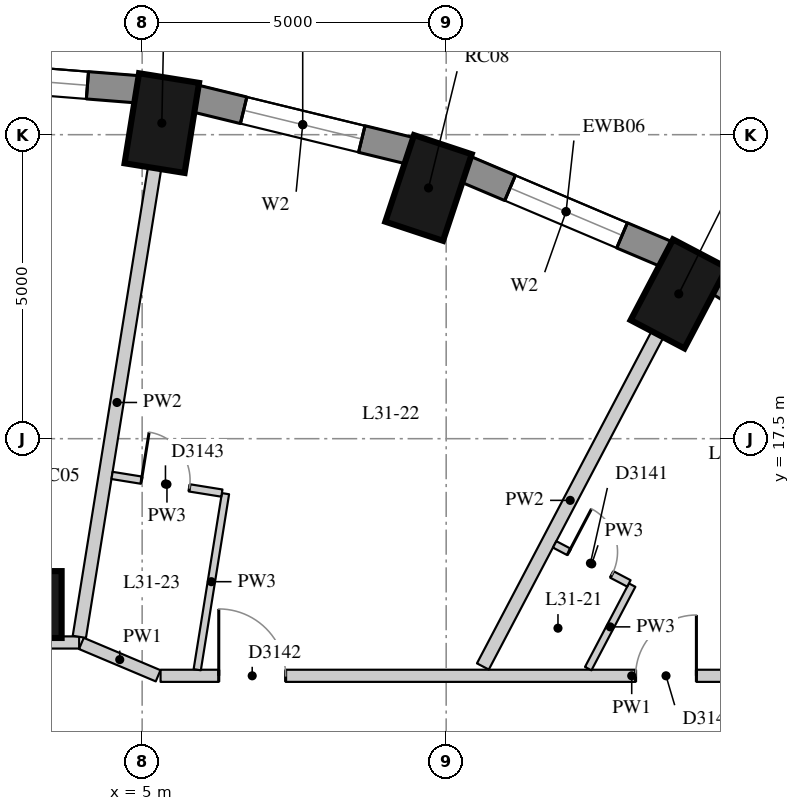
"""IFC4 building model, lengths in metres.
Left out: names, types, materials, properties, quantities, classifications, styles, units other than length and angle.
Written with IfcOpenShell. Run it as: python <this file> out.ifc"""

import sys

from ifc_helpers import new_model, si_unit, direction, frame, frame_2d, origin, origin_2d, place, context, subcontext, project, spatial, rectangle, extrude, element, fill, save


model = new_model("IFC4")
c1 = context("Model", 3, precision=1e-05, world=origin(), true_north=direction((0.0, 1.0)))
c2 = subcontext(c1, "Body", "Model", "MODEL_VIEW")
j1 = project(units=[si_unit("LENGTHUNIT", "METRE"), si_unit("PLANEANGLEUNIT", "RADIAN")], contexts=[c1])
p1 = place(None, origin())
s1 = spatial("IfcSite", under=j1, at=p1, CompositionType="ELEMENT")
p2 = place(p1, origin())
s2 = spatial("IfcBuilding", under=s1, at=p2, CompositionType="ELEMENT")
p3 = place(p2, frame((0.0, 0.0, 112.0)))
s3 = spatial("IfcBuildingStorey", under=s2, at=p3, CompositionType="ELEMENT", Elevation=112.0)
for number, where, z_axis, x_axis in (
    (1, (13.825, 19.882, 0.0), (0.0, 0.0, 1.0), (0.465, 0.885, 0.0)),
    (2, (9.71, 21.624, 0.0), (0.0, 0.0, 1.0), (0.315, 0.949, 0.0)),
    (3, (5.323, 22.691, 0.0), (0.0, 0.0, 1.0), (0.159, 0.987, 0.0)),
):
    element("IfcColumn", number, at=place(p3, frame(where, z_axis=z_axis, x_axis=x_axis)), inside=s3, PredefinedType="COLUMN", context=c2, shape_type="SweptSolid", body=[
        extrude(rectangle(XDim=1.5, YDim=1.0, at=origin_2d()), origin(), (0.0, 0.0, 1.0), 3.3),
    ])
p4 = place(p3, frame((3.126, 14.772, 0.0), z_axis=(0.0, 0.0, 1.0), x_axis=(1.0, 0.0, 0.0)))
e4 = element("IfcColumn", 4, at=p4, inside=s3, PredefinedType="COLUMN", context=c2, shape_type="SweptSolid", body=[
    extrude(rectangle(XDim=1.1, YDim=1.1, at=origin_2d()), origin(), (0.0, 0.0, 1.0), 3.3),
])
p5 = place(p3, frame((17.456, 18.192, 0.0), z_axis=(0.0, 0.0, 1.0), x_axis=(-0.843880549131, 0.536531097699, 0.0)))
e5 = element("IfcWall", 5, at=p5, inside=s3, PredefinedType="SOLIDWALL", context=c2, shape_type="SweptSolid", body=[
    extrude(rectangle(XDim=3.532, YDim=0.45, at=frame_2d((1.766, 0.0))), origin(), (0.0, 0.0, 1.0), 3.02),
])
p6 = place(p5, frame((0.766, 0.0, 0.4)))
e6 = element("IfcOpeningElement", 6, at=p6, cuts=e5, PredefinedType="OPENING", context=c2, shape_type="SweptSolid", body=[
    extrude(rectangle(XDim=2.0, YDim=1.75, at=frame_2d((1.0, 0.875))), frame((0.0, 0.235, 0.0), z_axis=(0.0, -1.0, 0.0), x_axis=(1.0, 0.0, 0.0)), (0.0, 0.0, 1.0), 0.47),
])
p7 = place(p3, frame((13.625, 20.533, 0.0), z_axis=(0.0, 0.0, 1.0), x_axis=(-0.920869643542, 0.389870619055, 0.0)))
e7 = element("IfcWall", 7, at=p7, inside=s3, PredefinedType="SOLIDWALL", context=c2, shape_type="SweptSolid", body=[
    extrude(rectangle(XDim=3.591, YDim=0.45, at=frame_2d((1.796, 0.0))), origin(), (0.0, 0.0, 1.0), 3.02),
])
p8 = place(p7, frame((0.796, 0.0, 0.4)))
e8 = element("IfcOpeningElement", 8, at=p8, cuts=e7, PredefinedType="OPENING", context=c2, shape_type="SweptSolid", body=[
    extrude(rectangle(XDim=2.0, YDim=1.75, at=frame_2d((1.0, 0.875))), frame((0.0, 0.235, 0.0), z_axis=(0.0, -1.0, 0.0), x_axis=(1.0, 0.0, 0.0)), (0.0, 0.0, 1.0), 0.47),
])
p9 = place(p3, frame((9.406, 22.235, 0.0), z_axis=(0.0, 0.0, 1.0), x_axis=(-0.971667603162, 0.236351579148, 0.0)))
e9 = element("IfcWall", 9, at=p9, inside=s3, PredefinedType="SOLIDWALL", context=c2, shape_type="SweptSolid", body=[
    extrude(rectangle(XDim=3.635, YDim=0.45, at=frame_2d((1.817, 0.0))), origin(), (0.0, 0.0, 1.0), 3.02),
])
p10 = place(p9, frame((0.817, 0.0, 0.4)))
e10 = element("IfcOpeningElement", 10, at=p10, cuts=e9, PredefinedType="OPENING", context=c2, shape_type="SweptSolid", body=[
    extrude(rectangle(XDim=2.0, YDim=1.75, at=frame_2d((1.0, 0.875))), frame((0.0, 0.235, 0.0), z_axis=(0.0, -1.0, 0.0), x_axis=(1.0, 0.0, 0.0)), (0.0, 0.0, 1.0), 0.47),
])
p11 = place(p3, frame((4.927, 23.247, 0.0), z_axis=(0.0, 0.0, 1.0), x_axis=(-0.996862216754, 0.079156306178, 0.0)))
e11 = element("IfcWall", 11, at=p11, inside=s3, PredefinedType="SOLIDWALL", context=c2, shape_type="SweptSolid", body=[
    extrude(rectangle(XDim=3.658, YDim=0.45, at=frame_2d((1.829, 0.0))), origin(), (0.0, 0.0, 1.0), 3.02),
])
p12 = place(p11, frame((0.829, 0.0, 0.4)))
e12 = element("IfcOpeningElement", 12, at=p12, cuts=e11, PredefinedType="OPENING", context=c2, shape_type="SweptSolid", body=[
    extrude(rectangle(XDim=2.0, YDim=1.75, at=frame_2d((1.0, 0.875))), frame((0.0, 0.235, 0.0), z_axis=(0.0, -1.0, 0.0), x_axis=(1.0, 0.0, 0.0)), (0.0, 0.0, 1.0), 0.47),
])
p13 = place(p3, frame((-2.324, 14.148, 0.0), z_axis=(0.0, 0.0, 1.0), x_axis=(1.0, 0.0, 0.0)))
e13 = element("IfcWall", 13, at=p13, inside=s3, PredefinedType="PARTITIONING", context=c2, shape_type="SweptSolid", body=[
    extrude(rectangle(XDim=6.288, YDim=0.2, at=frame_2d((3.144, 0.0))), origin(), (0.0, 0.0, 1.0), 3.02),
])
p14 = place(p13, frame((3.617, 0.0, 0.0)))
e14 = element("IfcOpeningElement", 14, at=p14, cuts=e13, PredefinedType="OPENING", context=c2, shape_type="SweptSolid", body=[
    extrude(rectangle(XDim=0.9, YDim=2.1, at=frame_2d((0.45, 1.05))), frame((0.0, 0.11, 0.0), z_axis=(0.0, -1.0, 0.0), x_axis=(1.0, 0.0, 0.0)), (0.0, 0.0, 1.0), 0.22),
])
p15 = place(p13, frame((0.22, 0.0, 0.0)))
e15 = element("IfcOpeningElement", 15, at=p15, cuts=e13, PredefinedType="OPENING", context=c2, shape_type="SweptSolid", body=[
    extrude(rectangle(XDim=1.0, YDim=2.1, at=frame_2d((0.5, 1.05))), frame((0.0, 0.11, 0.0), z_axis=(0.0, -1.0, 0.0), x_axis=(1.0, 0.0, 0.0)), (0.0, 0.0, 1.0), 0.22),
])
p16 = place(p3, frame((4.0, 14.133, 0.0), z_axis=(0.0, 0.0, 1.0), x_axis=(0.921370144432, -0.388686322051, 0.0)))
e16 = element("IfcWall", 16, at=p16, inside=s3, PredefinedType="PARTITIONING", context=c2, shape_type="SweptSolid", body=[
    extrude(rectangle(XDim=1.37, YDim=0.2, at=frame_2d((0.685, 0.0))), origin(), (0.0, 0.0, 1.0), 3.02),
])
p17 = place(p3, frame((5.303, 13.6, 0.0), z_axis=(0.0, 0.0, 1.0), x_axis=(1.0, 0.0, 0.0)))
e17 = element("IfcWall", 17, at=p17, inside=s3, PredefinedType="PARTITIONING", context=c2, shape_type="SweptSolid", body=[
    extrude(rectangle(XDim=15.497, YDim=0.2, at=frame_2d((7.749, 0.0))), origin(), (0.0, 0.0, 1.0), 3.02),
])
p18 = place(p17, frame((7.812, 0.0, 0.0)))
e18 = element("IfcOpeningElement", 18, at=p18, cuts=e17, PredefinedType="OPENING", context=c2, shape_type="SweptSolid", body=[
    extrude(rectangle(XDim=1.0, YDim=2.1, at=frame_2d((0.5, 1.05))), frame((0.0, 0.11, 0.0), z_axis=(0.0, -1.0, 0.0), x_axis=(1.0, 0.0, 0.0)), (0.0, 0.0, 1.0), 0.22),
])
p19 = place(p17, frame((0.957, 0.0, 0.0)))
e19 = element("IfcOpeningElement", 19, at=p19, cuts=e17, PredefinedType="OPENING", context=c2, shape_type="SweptSolid", body=[
    extrude(rectangle(XDim=1.1, YDim=2.1, at=frame_2d((0.55, 1.05))), frame((0.0, 0.11, 0.0), z_axis=(0.0, -1.0, 0.0), x_axis=(1.0, 0.0, 0.0)), (0.0, 0.0, 1.0), 0.22),
])
p20 = place(p17, frame((11.467, 0.0, 0.0)))
e20 = element("IfcOpeningElement", 20, at=p20, cuts=e17, PredefinedType="OPENING", context=c2, shape_type="SweptSolid", body=[
    extrude(rectangle(XDim=1.8, YDim=2.1, at=frame_2d((0.9, 1.05))), frame((0.0, 0.11, 0.0), z_axis=(0.0, -1.0, 0.0), x_axis=(1.0, 0.0, 0.0)), (0.0, 0.0, 1.0), 0.22),
])
p21 = place(p3, frame((13.476, 19.218, 0.0), z_axis=(0.0, 0.0, 1.0), x_axis=(-0.465345394262, -0.885129179295, 0.0)))
e21 = element("IfcWall", 21, at=p21, inside=s3, PredefinedType="PARTITIONING", context=c2, shape_type="SweptSolid", body=[
    extrude(rectangle(XDim=6.173, YDim=0.22, at=frame_2d((3.086, 0.0))), origin(), (0.0, 0.0, 1.0), 3.02),
])
p22 = place(p3, frame((5.205, 21.95, 0.0), z_axis=(0.0, 0.0, 1.0), x_axis=(-0.158499016873, -0.987359135092, 0.0)))
e22 = element("IfcWall", 22, at=p22, inside=s3, PredefinedType="PARTITIONING", context=c2, shape_type="SweptSolid", body=[
    extrude(rectangle(XDim=7.808, YDim=0.22, at=frame_2d((3.904, 0.0))), origin(), (0.0, 0.0, 1.0), 3.02),
])
p23 = place(p3, frame((12.336, 13.718, 0.0), z_axis=(0.0, 0.0, 1.0), x_axis=(0.465428746876, 0.88508535271, 0.0)))
e23 = element("IfcWall", 23, at=p23, inside=s3, PredefinedType="PARTITIONING", context=c2, shape_type="SweptSolid", body=[
    extrude(rectangle(XDim=1.552, YDim=0.12, at=frame_2d((0.776, 0.0))), origin(), (0.0, 0.0, 1.0), 3.02),
])
p24 = place(p3, frame((5.906, 13.7, 0.0), z_axis=(0.0, 0.0, 1.0), x_axis=(0.158509986532, 0.98735737409, 0.0)))
e24 = element("IfcWall", 24, at=p24, inside=s3, PredefinedType="PARTITIONING", context=c2, shape_type="SweptSolid", body=[
    extrude(rectangle(XDim=2.933, YDim=0.12, at=frame_2d((1.466, 0.0))), origin(), (0.0, 0.0, 1.0), 3.02),
])
p25 = place(p3, frame((13.005, 15.12, 0.0), z_axis=(0.0, 0.0, 1.0), x_axis=(-0.885148383454, 0.465308864378, 0.0)))
e25 = element("IfcWall", 25, at=p25, inside=s3, PredefinedType="PARTITIONING", context=c2, shape_type="SweptSolid", body=[
    extrude(rectangle(XDim=1.38, YDim=0.12, at=frame_2d((0.69, 0.0))), origin(), (0.0, 0.0, 1.0), 3.02),
])
p26 = place(p25, frame((0.315, 0.0, 0.0)))
e26 = element("IfcOpeningElement", 26, at=p26, cuts=e25, PredefinedType="OPENING", context=c2, shape_type="SweptSolid", body=[
    extrude(rectangle(XDim=0.8, YDim=2.1, at=frame_2d((0.4, 1.05))), frame((0.0, 0.07, 0.0), z_axis=(0.0, -1.0, 0.0), x_axis=(1.0, 0.0, 0.0)), (0.0, 0.0, 1.0), 0.14),
])
p27 = place(p3, frame((6.311, 16.605, 0.0), z_axis=(0.0, 0.0, 1.0), x_axis=(-0.987336342922, 0.158640934018, 0.0)))
e27 = element("IfcWall", 27, at=p27, inside=s3, PredefinedType="PARTITIONING", context=c2, shape_type="SweptSolid", body=[
    extrude(rectangle(XDim=1.83, YDim=0.12, at=frame_2d((0.915, 0.0))), origin(), (0.0, 0.0, 1.0), 3.02),
])
p28 = place(p27, frame((0.54, 0.0, 0.0)))
e28 = element("IfcOpeningElement", 28, at=p28, cuts=e27, PredefinedType="OPENING", context=c2, shape_type="SweptSolid", body=[
    extrude(rectangle(XDim=0.8, YDim=2.1, at=frame_2d((0.4, 1.05))), frame((0.0, 0.07, 0.0), z_axis=(0.0, -1.0, 0.0), x_axis=(1.0, 0.0, 0.0)), (0.0, 0.0, 1.0), 0.14),
])
p29 = place(p8, origin())
e29 = element("IfcWindow", 29, at=p29, inside=s3, PartitioningType="SINGLE_PANEL", PredefinedType="WINDOW", context=c2, shape_type="SweptSolid", body=[
    extrude(rectangle(XDim=2.0, YDim=1.75, at=frame_2d((1.0, 0.875))), frame((0.0, 0.035, 0.0), z_axis=(0.0, -1.0, 0.0), x_axis=(1.0, 0.0, 0.0)), (0.0, 0.0, 1.0), 0.06),
])
fill(e8, e29)
p30 = place(p10, origin())
e30 = element("IfcWindow", 30, at=p30, inside=s3, PartitioningType="SINGLE_PANEL", PredefinedType="WINDOW", context=c2, shape_type="SweptSolid", body=[
    extrude(rectangle(XDim=2.0, YDim=1.75, at=frame_2d((1.0, 0.875))), frame((0.0, 0.035, 0.0), z_axis=(0.0, -1.0, 0.0), x_axis=(1.0, 0.0, 0.0)), (0.0, 0.0, 1.0), 0.06),
])
fill(e10, e30)
p31 = place(p12, origin())
e31 = element("IfcWindow", 31, at=p31, inside=s3, PartitioningType="SINGLE_PANEL", PredefinedType="WINDOW", context=c2, shape_type="SweptSolid", body=[
    extrude(rectangle(XDim=2.0, YDim=1.75, at=frame_2d((1.0, 0.875))), frame((0.0, 0.035, 0.0), z_axis=(0.0, -1.0, 0.0), x_axis=(1.0, 0.0, 0.0)), (0.0, 0.0, 1.0), 0.06),
])
fill(e12, e31)
p32 = place(p18, origin())
e32 = element("IfcDoor", 32, at=p32, inside=s3, OperationType="SINGLE_SWING_RIGHT", PredefinedType="DOOR", context=c2, shape_type="SweptSolid", body=[
    extrude(rectangle(XDim=1.0, YDim=2.1, at=frame_2d((0.5, 1.05))), frame((0.0, 0.025, 0.0), z_axis=(0.0, -1.0, 0.0), x_axis=(1.0, 0.0, 0.0)), (0.0, 0.0, 1.0), 0.05),
])
fill(e18, e32)
p33 = place(p26, origin())
e33 = element("IfcDoor", 33, at=p33, inside=s3, OperationType="SINGLE_SWING_LEFT", PredefinedType="DOOR", context=c2, shape_type="SweptSolid", body=[
    extrude(rectangle(XDim=0.8, YDim=2.1, at=frame_2d((0.4, 1.05))), frame((0.0, 0.025, 0.0), z_axis=(0.0, -1.0, 0.0), x_axis=(1.0, 0.0, 0.0)), (0.0, 0.0, 1.0), 0.05),
])
fill(e26, e33)
p34 = place(p19, origin())
e34 = element("IfcDoor", 34, at=p34, inside=s3, OperationType="SINGLE_SWING_LEFT", PredefinedType="DOOR", context=c2, shape_type="SweptSolid", body=[
    extrude(rectangle(XDim=1.1, YDim=2.1, at=frame_2d((0.55, 1.05))), frame((0.0, 0.025, 0.0), z_axis=(0.0, -1.0, 0.0), x_axis=(1.0, 0.0, 0.0)), (0.0, 0.0, 1.0), 0.05),
])
fill(e19, e34)
p35 = place(p28, origin())
e35 = element("IfcDoor", 35, at=p35, inside=s3, OperationType="SINGLE_SWING_LEFT", PredefinedType="DOOR", context=c2, shape_type="SweptSolid", body=[
    extrude(rectangle(XDim=0.8, YDim=2.1, at=frame_2d((0.4, 1.05))), frame((0.0, 0.025, 0.0), z_axis=(0.0, -1.0, 0.0), x_axis=(1.0, 0.0, 0.0)), (0.0, 0.0, 1.0), 0.05),
])
fill(e28, e35)
save(model, sys.argv[1])
